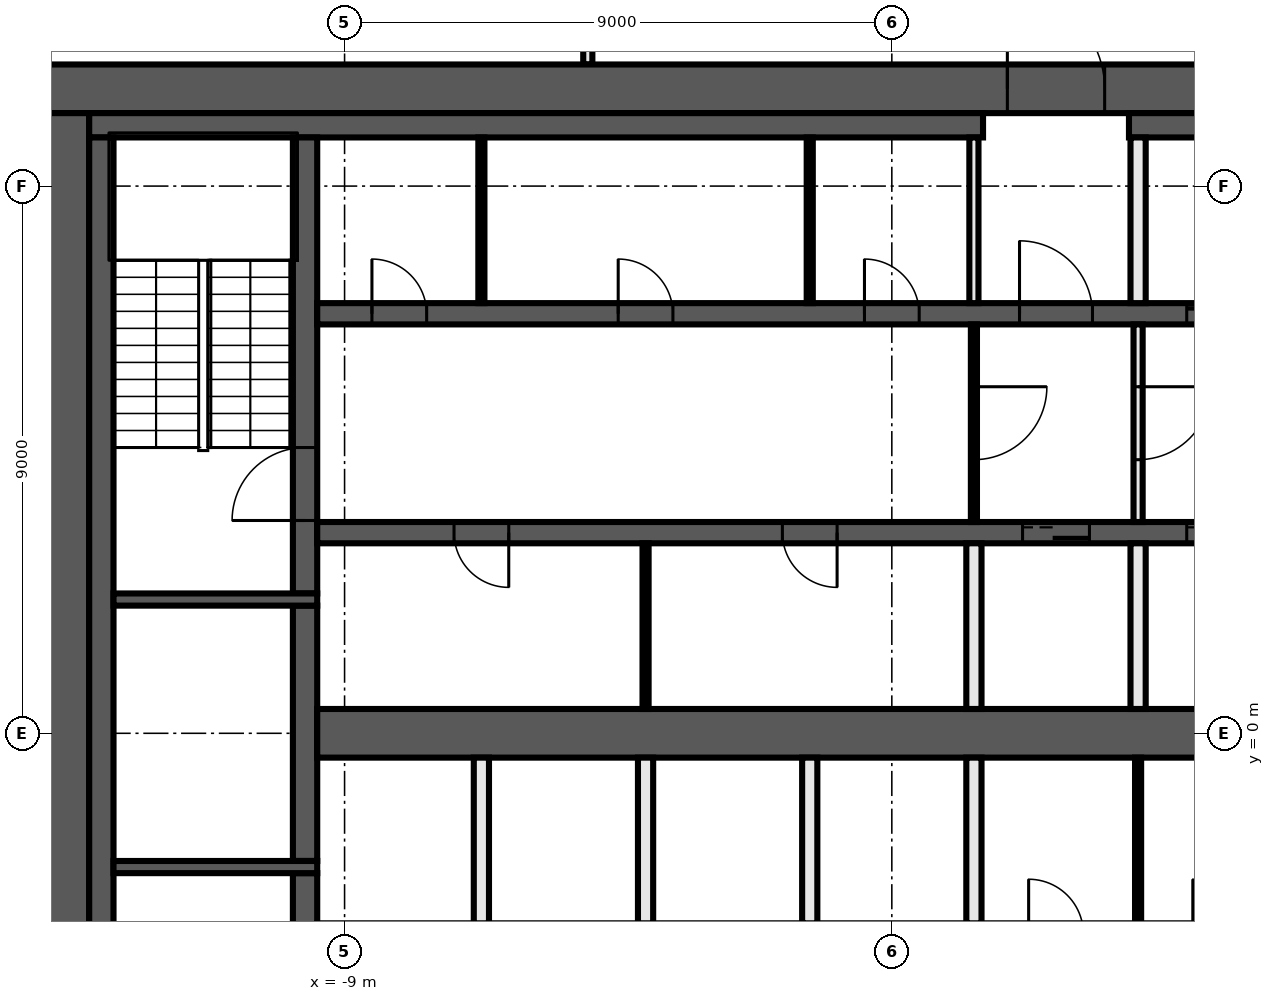
"""IFC4 building model, lengths in metres.
Left out: names, types, materials, properties, quantities, classifications, styles, units other than length and angle.
Written with IfcOpenShell. Run it as: python <this file> out.ifc"""

import sys

from ifc_helpers import new_model, si_unit, direction, frame, frame_2d, origin, place, context, subcontext, project, spatial, rectangle, extrude, element, fill, save


model = new_model("IFC4")
c1 = context("Model", 3, precision=1e-05, world=origin(), true_north=direction((0.0, 1.0)))
c2 = subcontext(c1, "Body", "Model", "MODEL_VIEW")
j1 = project(units=[si_unit("LENGTHUNIT", "METRE"), si_unit("PLANEANGLEUNIT", "RADIAN")], contexts=[c1])
p1 = place(None, origin())
s1 = spatial("IfcSite", under=j1, at=p1, CompositionType="ELEMENT")
p2 = place(p1, origin())
s2 = spatial("IfcBuilding", under=s1, at=p2, CompositionType="ELEMENT")
p3 = place(p2, frame((0.0, 0.0, 203.0)))
s3 = spatial("IfcBuildingStorey", under=s2, at=p3, CompositionType="ELEMENT", Elevation=203.0)
p4 = place(p3, frame((-5.0, 11.0, 0.0), z_axis=(0.0, 0.0, 1.0), x_axis=(0.0, 1.0, 0.0)))
e1 = element("IfcWall", 1, at=p4, inside=s3, PredefinedType="PARTITIONING", context=c2, shape_type="SweptSolid", body=[
    extrude(rectangle(XDim=3.125, YDim=0.15, at=frame_2d((1.562, 0.0))), origin(), (0.0, 0.0, 1.0), 3.82),
])
p5 = place(p3, frame((-14.0, 10.6, 0.0), z_axis=(0.0, 0.0, 1.0), x_axis=(1.0, 0.0, 0.0)))
e2 = element("IfcWall", 2, at=p5, inside=s3, PredefinedType="SHEAR", context=c2, shape_type="SweptSolid", body=[
    extrude(rectangle(XDim=28.0, YDim=0.8, at=frame_2d((14.0, 0.0))), origin(), (0.0, 0.0, 1.0), 3.82),
])
p6 = place(p5, frame((15.9, 0.0, 0.0)))
e3 = element("IfcOpeningElement", 3, at=p6, cuts=e2, PredefinedType="OPENING", context=c2, shape_type="SweptSolid", body=[
    extrude(rectangle(XDim=1.6, YDim=2.1, at=frame_2d((0.8, 1.05))), frame((0.0, 0.41, 0.0), z_axis=(0.0, -1.0, 0.0), x_axis=(1.0, 0.0, 0.0)), (0.0, 0.0, 1.0), 0.82),
])
p7 = place(p3, frame((-13.6, -10.2, 0.0), z_axis=(0.0, 0.0, 1.0), x_axis=(0.0, 1.0, 0.0)))
e4 = element("IfcWall", 4, at=p7, inside=s3, PredefinedType="SHEAR", context=c2, shape_type="SweptSolid", body=[
    extrude(rectangle(XDim=20.4, YDim=0.8, at=frame_2d((10.2, 0.0))), origin(), (0.0, 0.0, 1.0), 3.82),
])
p8 = place(p3, frame((-13.2, 10.0, 0.0), z_axis=(0.0, 0.0, 1.0), x_axis=(1.0, 0.0, 0.0)))
e5 = element("IfcWall", 5, at=p8, inside=s3, PredefinedType="SHEAR", context=c2, shape_type="SweptSolid", body=[
    extrude(rectangle(XDim=14.7, YDim=0.4, at=frame_2d((7.35, 0.0))), origin(), (0.0, 0.0, 1.0), 3.82),
])
p9 = place(p3, frame((3.9, 10.0, 0.0), z_axis=(0.0, 0.0, 1.0), x_axis=(1.0, 0.0, 0.0)))
e6 = element("IfcWall", 6, at=p9, inside=s3, PredefinedType="SHEAR", context=c2, shape_type="SweptSolid", body=[
    extrude(rectangle(XDim=9.3, YDim=0.4, at=frame_2d((4.65, 0.0))), origin(), (0.0, 0.0, 1.0), 3.82),
])
p10 = place(p3, frame((-13.0, -9.8, 0.0), z_axis=(0.0, 0.0, 1.0), x_axis=(0.0, 1.0, 0.0)))
e7 = element("IfcWall", 7, at=p10, inside=s3, PredefinedType="SHEAR", context=c2, shape_type="SweptSolid", body=[
    extrude(rectangle(XDim=19.6, YDim=0.4, at=frame_2d((9.8, 0.0))), origin(), (0.0, 0.0, 1.0), 3.82),
])
p11 = place(p3, frame((-9.65, -9.8, 0.0), z_axis=(0.0, 0.0, 1.0), x_axis=(0.0, 1.0, 0.0)))
e8 = element("IfcWall", 8, at=p11, inside=s3, PredefinedType="SHEAR", context=c2, shape_type="SweptSolid", body=[
    extrude(rectangle(XDim=7.5, YDim=0.4, at=frame_2d((3.75, 0.0))), origin(), (0.0, 0.0, 1.0), 3.82),
])
p12 = place(p11, frame((5.1, 0.0, 0.0)))
e9 = element("IfcOpeningElement", 9, at=p12, cuts=e8, PredefinedType="OPENING", context=c2, shape_type="SweptSolid", body=[
    extrude(rectangle(XDim=1.2, YDim=2.1, at=frame_2d((0.6, 1.05))), frame((0.0, 0.21, 0.0), z_axis=(0.0, -1.0, 0.0), x_axis=(1.0, 0.0, 0.0)), (0.0, 0.0, 1.0), 0.42),
])
p13 = place(p3, frame((-9.65, -2.1, 0.0), z_axis=(0.0, 0.0, 1.0), x_axis=(0.0, 1.0, 0.0)))
e10 = element("IfcWall", 10, at=p13, inside=s3, PredefinedType="SHEAR", context=c2, shape_type="SweptSolid", body=[
    extrude(rectangle(XDim=4.2, YDim=0.4, at=frame_2d((2.1, 0.0))), origin(), (0.0, 0.0, 1.0), 3.82),
])
p14 = place(p3, frame((-9.65, 2.3, 0.0), z_axis=(0.0, 0.0, 1.0), x_axis=(0.0, 1.0, 0.0)))
e11 = element("IfcWall", 11, at=p14, inside=s3, PredefinedType="SHEAR", context=c2, shape_type="SweptSolid", body=[
    extrude(rectangle(XDim=7.5, YDim=0.4, at=frame_2d((3.75, 0.0))), origin(), (0.0, 0.0, 1.0), 3.82),
])
p15 = place(p14, frame((1.2, 0.0, 0.0)))
e12 = element("IfcOpeningElement", 12, at=p15, cuts=e11, PredefinedType="OPENING", context=c2, shape_type="SweptSolid", body=[
    extrude(rectangle(XDim=1.2, YDim=2.1, at=frame_2d((0.6, 1.05))), frame((0.0, 0.21, 0.0), z_axis=(0.0, -1.0, 0.0), x_axis=(1.0, 0.0, 0.0)), (0.0, 0.0, 1.0), 0.42),
])
for number, where, z_axis, x_axis in (
    (13, (-9.45, 2.2, 0.0), (0.0, 0.0, 1.0), (-1.0, 0.0, 0.0)),
    (14, (-9.45, -2.2, 0.0), (0.0, 0.0, 1.0), (-1.0, 0.0, 0.0)),
):
    element("IfcWall", number, at=place(p3, frame(where, z_axis=z_axis, x_axis=x_axis)), inside=s3, PredefinedType="SHEAR", context=c2, shape_type="SweptSolid", body=[
        extrude(rectangle(XDim=3.35, YDim=0.2, at=frame_2d((1.675, 0.0))), origin(), (0.0, 0.0, 1.0), 3.82),
    ])
p16 = place(p3, frame((-9.45, 6.9, 0.0), z_axis=(0.0, 0.0, 1.0), x_axis=(1.0, 0.0, 0.0)))
e15 = element("IfcWall", 15, at=p16, inside=s3, PredefinedType="SHEAR", context=c2, shape_type="SweptSolid", body=[
    extrude(rectangle(XDim=18.9, YDim=0.35, at=frame_2d((9.45, 0.0))), origin(), (0.0, 0.0, 1.0), 3.82),
])
p17 = place(p16, frame((11.55, 0.0, 0.0)))
e16 = element("IfcOpeningElement", 16, at=p17, cuts=e15, PredefinedType="OPENING", context=c2, shape_type="SweptSolid", body=[
    extrude(rectangle(XDim=1.2, YDim=2.1, at=frame_2d((0.6, 1.05))), frame((0.0, 0.185, 0.0), z_axis=(0.0, -1.0, 0.0), x_axis=(1.0, 0.0, 0.0)), (0.0, 0.0, 1.0), 0.37),
])
p18 = place(p16, frame((14.3, 0.0, 0.0)))
e17 = element("IfcOpeningElement", 17, at=p18, cuts=e15, PredefinedType="OPENING", context=c2, shape_type="SweptSolid", body=[
    extrude(rectangle(XDim=1.1, YDim=2.1, at=frame_2d((0.55, 1.05))), frame((0.0, 0.185, 0.0), z_axis=(0.0, -1.0, 0.0), x_axis=(1.0, 0.0, 0.0)), (0.0, 0.0, 1.0), 0.37),
])
p19 = place(p16, frame((17.0, 0.0, 0.0)))
e18 = element("IfcOpeningElement", 18, at=p19, cuts=e15, PredefinedType="OPENING", context=c2, shape_type="SweptSolid", body=[
    extrude(rectangle(XDim=1.1, YDim=2.1, at=frame_2d((0.55, 1.05))), frame((0.0, 0.185, 0.0), z_axis=(0.0, -1.0, 0.0), x_axis=(1.0, 0.0, 0.0)), (0.0, 0.0, 1.0), 0.37),
])
p20 = place(p16, frame((0.9, 0.0, 0.0)))
e19 = element("IfcOpeningElement", 19, at=p20, cuts=e15, PredefinedType="OPENING", context=c2, shape_type="SweptSolid", body=[
    extrude(rectangle(XDim=0.9, YDim=2.1, at=frame_2d((0.45, 1.05))), frame((0.0, 0.185, 0.0), z_axis=(0.0, -1.0, 0.0), x_axis=(1.0, 0.0, 0.0)), (0.0, 0.0, 1.0), 0.37),
])
p21 = place(p16, frame((4.95, 0.0, 0.0)))
e20 = element("IfcOpeningElement", 20, at=p21, cuts=e15, PredefinedType="OPENING", context=c2, shape_type="SweptSolid", body=[
    extrude(rectangle(XDim=0.9, YDim=2.1, at=frame_2d((0.45, 1.05))), frame((0.0, 0.185, 0.0), z_axis=(0.0, -1.0, 0.0), x_axis=(1.0, 0.0, 0.0)), (0.0, 0.0, 1.0), 0.37),
])
p22 = place(p16, frame((9.0, 0.0, 0.0)))
e21 = element("IfcOpeningElement", 21, at=p22, cuts=e15, PredefinedType="OPENING", context=c2, shape_type="SweptSolid", body=[
    extrude(rectangle(XDim=0.9, YDim=2.1, at=frame_2d((0.45, 1.05))), frame((0.0, 0.185, 0.0), z_axis=(0.0, -1.0, 0.0), x_axis=(1.0, 0.0, 0.0)), (0.0, 0.0, 1.0), 0.37),
])
p23 = place(p3, frame((9.45, 3.3, 0.0), z_axis=(0.0, 0.0, 1.0), x_axis=(-1.0, 0.0, 0.0)))
e22 = element("IfcWall", 22, at=p23, inside=s3, PredefinedType="SHEAR", context=c2, shape_type="SweptSolid", body=[
    extrude(rectangle(XDim=18.9, YDim=0.35, at=frame_2d((9.45, 0.0))), origin(), (0.0, 0.0, 1.0), 3.82),
])
p24 = place(p23, frame((6.2, 0.0, 0.0)))
e23 = element("IfcOpeningElement", 23, at=p24, cuts=e22, PredefinedType="OPENING", context=c2, shape_type="SweptSolid", body=[
    extrude(rectangle(XDim=1.1, YDim=2.1, at=frame_2d((0.55, 1.05))), frame((0.0, 0.185, 0.0), z_axis=(0.0, -1.0, 0.0), x_axis=(1.0, 0.0, 0.0)), (0.0, 0.0, 1.0), 0.37),
])
p25 = place(p23, frame((3.5, 0.0, 0.0)))
e24 = element("IfcOpeningElement", 24, at=p25, cuts=e22, PredefinedType="OPENING", context=c2, shape_type="SweptSolid", body=[
    extrude(rectangle(XDim=1.1, YDim=2.1, at=frame_2d((0.55, 1.05))), frame((0.0, 0.185, 0.0), z_axis=(0.0, -1.0, 0.0), x_axis=(1.0, 0.0, 0.0)), (0.0, 0.0, 1.0), 0.37),
])
p26 = place(p23, frame((0.9, 0.0, 0.0)))
e25 = element("IfcOpeningElement", 25, at=p26, cuts=e22, PredefinedType="OPENING", context=c2, shape_type="SweptSolid", body=[
    extrude(rectangle(XDim=0.9, YDim=2.1, at=frame_2d((0.45, 1.05))), frame((0.0, 0.185, 0.0), z_axis=(0.0, -1.0, 0.0), x_axis=(1.0, 0.0, 0.0)), (0.0, 0.0, 1.0), 0.37),
])
p27 = place(p23, frame((15.75, 0.0, 0.0)))
e26 = element("IfcOpeningElement", 26, at=p27, cuts=e22, PredefinedType="OPENING", context=c2, shape_type="SweptSolid", body=[
    extrude(rectangle(XDim=0.9, YDim=2.1, at=frame_2d((0.45, 1.05))), frame((0.0, 0.185, 0.0), z_axis=(0.0, -1.0, 0.0), x_axis=(1.0, 0.0, 0.0)), (0.0, 0.0, 1.0), 0.37),
])
p28 = place(p23, frame((10.35, 0.0, 0.0)))
e27 = element("IfcOpeningElement", 27, at=p28, cuts=e22, PredefinedType="OPENING", context=c2, shape_type="SweptSolid", body=[
    extrude(rectangle(XDim=0.9, YDim=2.1, at=frame_2d((0.45, 1.05))), frame((0.0, 0.185, 0.0), z_axis=(0.0, -1.0, 0.0), x_axis=(1.0, 0.0, 0.0)), (0.0, 0.0, 1.0), 0.37),
])
p29 = place(p3, frame((-9.45, 0.0, 0.0), z_axis=(0.0, 0.0, 1.0), x_axis=(1.0, 0.0, 0.0)))
e28 = element("IfcWall", 28, at=p29, inside=s3, PredefinedType="SHEAR", context=c2, shape_type="SweptSolid", body=[
    extrude(rectangle(XDim=18.9, YDim=0.8, at=frame_2d((9.45, 0.0))), origin(), (0.0, 0.0, 1.0), 3.82),
])
p30 = place(p3, frame((4.05, 6.725, 0.0), z_axis=(0.0, 0.0, 1.0), x_axis=(0.0, -1.0, 0.0)))
e29 = element("IfcWall", 29, at=p30, inside=s3, PredefinedType="PARTITIONING", context=c2, shape_type="SweptSolid", body=[
    extrude(rectangle(XDim=3.25, YDim=0.15, at=frame_2d((1.625, 0.0))), origin(), (0.0, 0.0, 1.0), 3.82),
])
p31 = place(p30, frame((1.025, 0.0, 0.0)))
e30 = element("IfcOpeningElement", 30, at=p31, cuts=e29, PredefinedType="OPENING", context=c2, shape_type="SweptSolid", body=[
    extrude(rectangle(XDim=1.2, YDim=2.1, at=frame_2d((0.6, 1.05))), frame((0.0, 0.085, 0.0), z_axis=(0.0, -1.0, 0.0), x_axis=(1.0, 0.0, 0.0)), (0.0, 0.0, 1.0), 0.17),
])
p32 = place(p3, frame((4.05, -3.125, 0.0), z_axis=(0.0, 0.0, 1.0), x_axis=(0.0, 1.0, 0.0)))
e31 = element("IfcWall", 31, at=p32, inside=s3, PredefinedType="PARTITIONING", context=c2, shape_type="SweptSolid", body=[
    extrude(rectangle(XDim=2.725, YDim=0.1, at=frame_2d((1.363, 0.0))), origin(), (0.0, 0.0, 1.0), 3.82),
])
for number, where, z_axis, x_axis in (
    (32, (4.05, 0.4, 0.0), (0.0, 0.0, 1.0), (0.0, 1.0, 0.0)),
    (33, (4.05, 7.075, 0.0), (0.0, 0.0, 1.0), (0.0, 1.0, 0.0)),
):
    element("IfcWall", number, at=place(p3, frame(where, z_axis=z_axis, x_axis=x_axis)), inside=s3, PredefinedType="SOLIDWALL", context=c2, shape_type="SweptSolid", body=[
        extrude(rectangle(XDim=2.725, YDim=0.25, at=frame_2d((1.363, 0.0))), origin(), (0.0, 0.0, 1.0), 3.82),
    ])
p33 = place(p3, frame((1.35, 7.075, 0.0), z_axis=(0.0, 0.0, 1.0), x_axis=(0.0, 1.0, 0.0)))
e34 = element("IfcWall", 34, at=p33, inside=s3, PredefinedType="PARTITIONING", context=c2, shape_type="SweptSolid", body=[
    extrude(rectangle(XDim=2.725, YDim=0.15, at=frame_2d((1.363, 0.0))), origin(), (0.0, 0.0, 1.0), 3.82),
])
p34 = place(p3, frame((1.35, 6.725, 0.0), z_axis=(0.0, 0.0, 1.0), x_axis=(0.0, -1.0, 0.0)))
e35 = element("IfcWall", 35, at=p34, inside=s3, PredefinedType="PARTITIONING", context=c2, shape_type="SweptSolid", body=[
    extrude(rectangle(XDim=3.25, YDim=0.1, at=frame_2d((1.625, 0.0))), origin(), (0.0, 0.0, 1.0), 3.82),
])
p35 = place(p34, frame((1.025, 0.0, 0.0)))
e36 = element("IfcOpeningElement", 36, at=p35, cuts=e35, PredefinedType="OPENING", context=c2, shape_type="SweptSolid", body=[
    extrude(rectangle(XDim=1.2, YDim=2.1, at=frame_2d((0.6, 1.05))), frame((0.0, 0.06, 0.0), z_axis=(0.0, -1.0, 0.0), x_axis=(1.0, 0.0, 0.0)), (0.0, 0.0, 1.0), 0.12),
])
for number, where, z_axis, x_axis in (
    (37, (1.35, -3.125, 0.0), (0.0, 0.0, 1.0), (0.0, 1.0, 0.0)),
    (38, (1.35, 0.4, 0.0), (0.0, 0.0, 1.0), (0.0, 1.0, 0.0)),
):
    element("IfcWall", number, at=place(p3, frame(where, z_axis=z_axis, x_axis=x_axis)), inside=s3, PredefinedType="SOLIDWALL", context=c2, shape_type="SweptSolid", body=[
        extrude(rectangle(XDim=2.725, YDim=0.25, at=frame_2d((1.363, 0.0))), origin(), (0.0, 0.0, 1.0), 3.82),
    ])
p36 = place(p3, frame((-1.35, 7.075, 0.0), z_axis=(0.0, 0.0, 1.0), x_axis=(0.0, 1.0, 0.0)))
e39 = element("IfcWall", 39, at=p36, inside=s3, PredefinedType="PARTITIONING", context=c2, shape_type="SweptSolid", body=[
    extrude(rectangle(XDim=2.725, YDim=0.1, at=frame_2d((1.363, 0.0))), origin(), (0.0, 0.0, 1.0), 3.82),
])
p37 = place(p3, frame((-1.35, -3.125, 0.0), z_axis=(0.0, 0.0, 1.0), x_axis=(0.0, 1.0, 0.0)))
e40 = element("IfcWall", 40, at=p37, inside=s3, PredefinedType="SOLIDWALL", context=c2, shape_type="SweptSolid", body=[
    extrude(rectangle(XDim=2.725, YDim=0.25, at=frame_2d((1.363, 0.0))), origin(), (0.0, 0.0, 1.0), 3.82),
])
p38 = place(p3, frame((-4.05, 0.4, 0.0), z_axis=(0.0, 0.0, 1.0), x_axis=(0.0, 1.0, 0.0)))
e41 = element("IfcWall", 41, at=p38, inside=s3, PredefinedType="PARTITIONING", context=c2, shape_type="SweptSolid", body=[
    extrude(rectangle(XDim=2.725, YDim=0.1, at=frame_2d((1.363, 0.0))), origin(), (0.0, 0.0, 1.0), 3.82),
])
p39 = place(p3, frame((-4.05, -3.125, 0.0), z_axis=(0.0, 0.0, 1.0), x_axis=(0.0, 1.0, 0.0)))
e42 = element("IfcWall", 42, at=p39, inside=s3, PredefinedType="SOLIDWALL", context=c2, shape_type="SweptSolid", body=[
    extrude(rectangle(XDim=2.725, YDim=0.25, at=frame_2d((1.363, 0.0))), origin(), (0.0, 0.0, 1.0), 3.82),
])
p40 = place(p3, frame((-6.75, 7.075, 0.0), z_axis=(0.0, 0.0, 1.0), x_axis=(0.0, 1.0, 0.0)))
e43 = element("IfcWall", 43, at=p40, inside=s3, PredefinedType="PARTITIONING", context=c2, shape_type="SweptSolid", body=[
    extrude(rectangle(XDim=2.725, YDim=0.1, at=frame_2d((1.363, 0.0))), origin(), (0.0, 0.0, 1.0), 3.82),
])
p41 = place(p3, frame((-6.75, -3.125, 0.0), z_axis=(0.0, 0.0, 1.0), x_axis=(0.0, 1.0, 0.0)))
e44 = element("IfcWall", 44, at=p41, inside=s3, PredefinedType="SOLIDWALL", context=c2, shape_type="SweptSolid", body=[
    extrude(rectangle(XDim=2.725, YDim=0.25, at=frame_2d((1.363, 0.0))), origin(), (0.0, 0.0, 1.0), 3.82),
])
p42 = place(p6, origin())
e45 = element("IfcDoor", 45, at=p42, inside=s3, OperationType="DOUBLE_DOOR_SINGLE_SWING", PredefinedType="DOOR", context=c2, shape_type="SweptSolid", body=[
    extrude(rectangle(XDim=1.6, YDim=2.1, at=frame_2d((0.8, 1.05))), frame((0.0, 0.025, 0.0), z_axis=(0.0, -1.0, 0.0), x_axis=(1.0, 0.0, 0.0)), (0.0, 0.0, 1.0), 0.05),
])
fill(e3, e45)
p43 = place(p17, origin())
e46 = element("IfcDoor", 46, at=p43, inside=s3, OperationType="SINGLE_SWING_LEFT", PredefinedType="DOOR", context=c2, shape_type="SweptSolid", body=[
    extrude(rectangle(XDim=1.2, YDim=2.1, at=frame_2d((0.6, 1.05))), frame((0.0, 0.025, 0.0), z_axis=(0.0, -1.0, 0.0), x_axis=(1.0, 0.0, 0.0)), (0.0, 0.0, 1.0), 0.05),
])
fill(e16, e46)
p44 = place(p18, origin())
e47 = element("IfcDoor", 47, at=p44, inside=s3, OperationType="DOUBLE_DOOR_SLIDING", PredefinedType="DOOR", context=c2, shape_type="SweptSolid", body=[
    extrude(rectangle(XDim=1.1, YDim=2.1, at=frame_2d((0.55, 1.05))), frame((0.0, 0.025, 0.0), z_axis=(0.0, -1.0, 0.0), x_axis=(1.0, 0.0, 0.0)), (0.0, 0.0, 1.0), 0.05),
])
fill(e17, e47)
p45 = place(p24, origin())
e48 = element("IfcDoor", 48, at=p45, inside=s3, OperationType="DOUBLE_DOOR_SLIDING", PredefinedType="DOOR", context=c2, shape_type="SweptSolid", body=[
    extrude(rectangle(XDim=1.1, YDim=2.1, at=frame_2d((0.55, 1.05))), frame((0.0, 0.025, 0.0), z_axis=(0.0, -1.0, 0.0), x_axis=(1.0, 0.0, 0.0)), (0.0, 0.0, 1.0), 0.05),
])
fill(e23, e48)
p46 = place(p25, origin())
e49 = element("IfcDoor", 49, at=p46, inside=s3, OperationType="DOUBLE_DOOR_SLIDING", PredefinedType="DOOR", context=c2, shape_type="SweptSolid", body=[
    extrude(rectangle(XDim=1.1, YDim=2.1, at=frame_2d((0.55, 1.05))), frame((0.0, 0.025, 0.0), z_axis=(0.0, -1.0, 0.0), x_axis=(1.0, 0.0, 0.0)), (0.0, 0.0, 1.0), 0.05),
])
fill(e24, e49)
p47 = place(p20, origin())
e50 = element("IfcDoor", 50, at=p47, inside=s3, OperationType="SINGLE_SWING_RIGHT", PredefinedType="DOOR", context=c2, shape_type="SweptSolid", body=[
    extrude(rectangle(XDim=0.9, YDim=2.1, at=frame_2d((0.45, 1.05))), frame((0.0, 0.025, 0.0), z_axis=(0.0, -1.0, 0.0), x_axis=(1.0, 0.0, 0.0)), (0.0, 0.0, 1.0), 0.05),
])
fill(e19, e50)
p48 = place(p21, origin())
e51 = element("IfcDoor", 51, at=p48, inside=s3, OperationType="SINGLE_SWING_LEFT", PredefinedType="DOOR", context=c2, shape_type="SweptSolid", body=[
    extrude(rectangle(XDim=0.9, YDim=2.1, at=frame_2d((0.45, 1.05))), frame((0.0, 0.025, 0.0), z_axis=(0.0, -1.0, 0.0), x_axis=(1.0, 0.0, 0.0)), (0.0, 0.0, 1.0), 0.05),
])
fill(e20, e51)
p49 = place(p22, origin())
e52 = element("IfcDoor", 52, at=p49, inside=s3, OperationType="SINGLE_SWING_RIGHT", PredefinedType="DOOR", context=c2, shape_type="SweptSolid", body=[
    extrude(rectangle(XDim=0.9, YDim=2.1, at=frame_2d((0.45, 1.05))), frame((0.0, 0.025, 0.0), z_axis=(0.0, -1.0, 0.0), x_axis=(1.0, 0.0, 0.0)), (0.0, 0.0, 1.0), 0.05),
])
fill(e21, e52)
p50 = place(p27, origin())
e53 = element("IfcDoor", 53, at=p50, inside=s3, OperationType="SINGLE_SWING_LEFT", PredefinedType="DOOR", context=c2, shape_type="SweptSolid", body=[
    extrude(rectangle(XDim=0.9, YDim=2.1, at=frame_2d((0.45, 1.05))), frame((0.0, 0.025, 0.0), z_axis=(0.0, -1.0, 0.0), x_axis=(1.0, 0.0, 0.0)), (0.0, 0.0, 1.0), 0.05),
])
fill(e26, e53)
p51 = place(p28, origin())
e54 = element("IfcDoor", 54, at=p51, inside=s3, OperationType="SINGLE_SWING_RIGHT", PredefinedType="DOOR", context=c2, shape_type="SweptSolid", body=[
    extrude(rectangle(XDim=0.9, YDim=2.1, at=frame_2d((0.45, 1.05))), frame((0.0, 0.025, 0.0), z_axis=(0.0, -1.0, 0.0), x_axis=(1.0, 0.0, 0.0)), (0.0, 0.0, 1.0), 0.05),
])
fill(e27, e54)
p52 = place(p15, origin())
e55 = element("IfcDoor", 55, at=p52, inside=s3, OperationType="SINGLE_SWING_RIGHT", PredefinedType="DOOR", context=c2, shape_type="SweptSolid", body=[
    extrude(rectangle(XDim=1.2, YDim=2.1, at=frame_2d((0.6, 1.05))), frame((0.0, 0.025, 0.0), z_axis=(0.0, -1.0, 0.0), x_axis=(1.0, 0.0, 0.0)), (0.0, 0.0, 1.0), 0.05),
])
fill(e12, e55)
p53 = place(p35, origin())
e56 = element("IfcDoor", 56, at=p53, inside=s3, OperationType="SINGLE_SWING_LEFT", PredefinedType="DOOR", context=c2, shape_type="SweptSolid", body=[
    extrude(rectangle(XDim=1.2, YDim=2.1, at=frame_2d((0.6, 1.05))), frame((0.0, 0.025, 0.0), z_axis=(0.0, -1.0, 0.0), x_axis=(1.0, 0.0, 0.0)), (0.0, 0.0, 1.0), 0.05),
])
fill(e36, e56)
p54 = place(p31, origin())
e57 = element("IfcDoor", 57, at=p54, inside=s3, OperationType="SINGLE_SWING_RIGHT", PredefinedType="DOOR", context=c2, shape_type="SweptSolid", body=[
    extrude(rectangle(XDim=1.2, YDim=2.1, at=frame_2d((0.6, 1.05))), frame((0.0, 0.025, 0.0), z_axis=(0.0, -1.0, 0.0), x_axis=(1.0, 0.0, 0.0)), (0.0, 0.0, 1.0), 0.05),
])
fill(e30, e57)
save(model, sys.argv[1])
